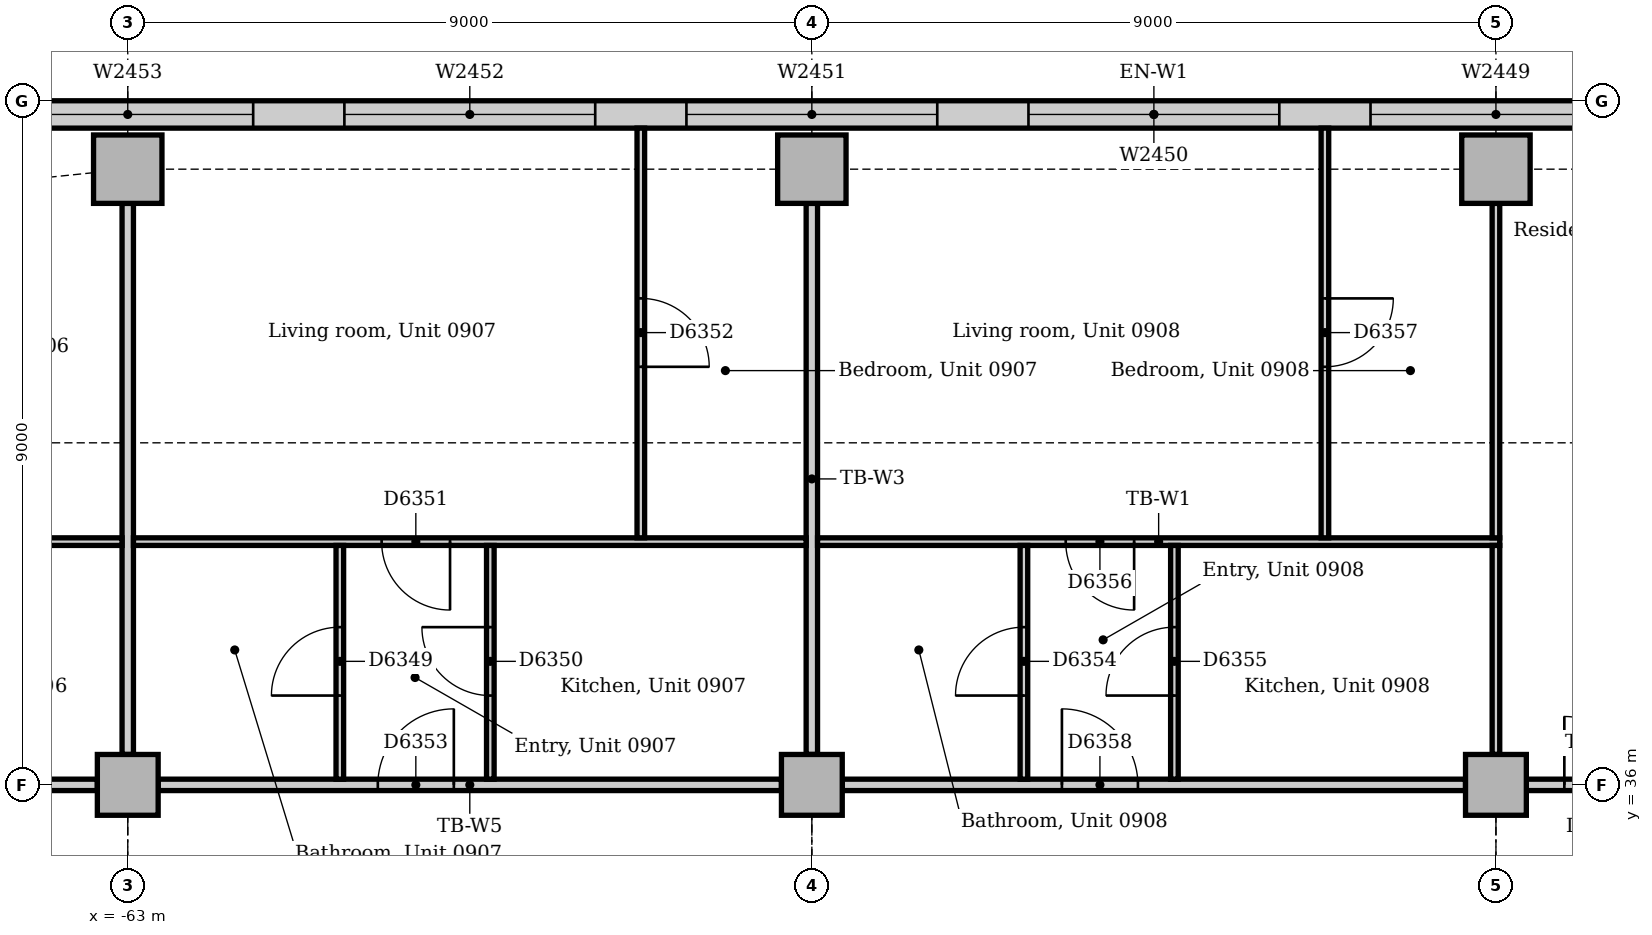
"""IFC4 building model, lengths in metres.
Left out: names, types, materials, properties, quantities, classifications, styles, units other than length and angle.
Written with IfcOpenShell. Run it as: python <this file> out.ifc"""

import sys

from ifc_helpers import new_model, si_unit, direction, frame, frame_2d, origin, origin_2d, place, context, subcontext, project, spatial, rectangle, extrude, element, fill, save


model = new_model("IFC4")
c1 = context("Model", 3, precision=1e-05, world=origin(), true_north=direction((0.0, 1.0)))
c2 = subcontext(c1, "Body", "Model", "MODEL_VIEW")
j1 = project(units=[si_unit("LENGTHUNIT", "METRE"), si_unit("PLANEANGLEUNIT", "RADIAN")], contexts=[c1])
p1 = place(None, origin())
s1 = spatial("IfcSite", under=j1, at=p1, CompositionType="ELEMENT")
p2 = place(p1, origin())
s2 = spatial("IfcBuilding", under=s1, at=p2, CompositionType="ELEMENT")
p3 = place(p2, frame((0.0, 0.0, 42.0)))
s3 = spatial("IfcBuildingStorey", under=s2, at=p3, CompositionType="ELEMENT", Elevation=42.0)
for number, where, z_axis, x_axis in (
    (1, (-63.0, 44.1, 0.0), (0.0, 0.0, 1.0), (1.0, 0.0, 0.0)),
    (2, (-54.0, 44.1, 0.0), (0.0, 0.0, 1.0), (1.0, 0.0, 0.0)),
    (3, (-45.0, 44.1, 0.0), (0.0, 0.0, 1.0), (1.0, 0.0, 0.0)),
):
    element("IfcColumn", number, at=place(p3, frame(where, z_axis=z_axis, x_axis=x_axis)), inside=s3, PredefinedType="COLUMN", context=c2, shape_type="SweptSolid", body=[
        extrude(rectangle(XDim=0.9, YDim=0.9, at=origin_2d()), origin(), (0.0, 0.0, 1.0), 3.7),
    ])
for number, where, z_axis, x_axis in (
    (4, (-63.0, 36.0, 0.0), (0.0, 0.0, 1.0), (1.0, 0.0, 0.0)),
    (5, (-54.0, 36.0, 0.0), (0.0, 0.0, 1.0), (1.0, 0.0, 0.0)),
    (6, (-45.0, 36.0, 0.0), (0.0, 0.0, 1.0), (1.0, 0.0, 0.0)),
):
    element("IfcColumn", number, at=place(p3, frame(where, z_axis=z_axis, x_axis=x_axis)), inside=s3, PredefinedType="COLUMN", context=c2, shape_type="SweptSolid", body=[
        extrude(rectangle(XDim=0.8, YDim=0.8, at=origin_2d()), origin(), (0.0, 0.0, 1.0), 3.7),
    ])
p4 = place(p3, frame((-31.243, 44.82, 0.0), z_axis=(0.0, 0.0, 1.0), x_axis=(-1.0, 0.0, 0.0)))
e7 = element("IfcWall", 7, at=p4, inside=s3, PredefinedType="STANDARD", context=c2, shape_type="SweptSolid", body=[
    extrude(rectangle(XDim=36.515, YDim=0.36, at=frame_2d((18.257, 0.0))), origin(), (0.0, 0.0, 1.0), 3.7),
])
p5 = place(p4, frame((3.107, 0.0, 0.9)))
e8 = element("IfcOpeningElement", 8, at=p5, cuts=e7, PredefinedType="OPENING", context=c2, shape_type="SweptSolid", body=[
    extrude(rectangle(XDim=3.3, YDim=1.6, at=frame_2d((1.65, 0.8))), frame((0.0, 0.19, 0.0), z_axis=(0.0, -1.0, 0.0), x_axis=(1.0, 0.0, 0.0)), (0.0, 0.0, 1.0), 0.38),
])
p6 = place(p4, frame((7.607, 0.0, 0.9)))
e9 = element("IfcOpeningElement", 9, at=p6, cuts=e7, PredefinedType="OPENING", context=c2, shape_type="SweptSolid", body=[
    extrude(rectangle(XDim=3.3, YDim=1.6, at=frame_2d((1.65, 0.8))), frame((0.0, 0.19, 0.0), z_axis=(0.0, -1.0, 0.0), x_axis=(1.0, 0.0, 0.0)), (0.0, 0.0, 1.0), 0.38),
])
p7 = place(p4, frame((12.107, 0.0, 0.9)))
e10 = element("IfcOpeningElement", 10, at=p7, cuts=e7, PredefinedType="OPENING", context=c2, shape_type="SweptSolid", body=[
    extrude(rectangle(XDim=3.3, YDim=1.6, at=frame_2d((1.65, 0.8))), frame((0.0, 0.19, 0.0), z_axis=(0.0, -1.0, 0.0), x_axis=(1.0, 0.0, 0.0)), (0.0, 0.0, 1.0), 0.38),
])
p8 = place(p4, frame((16.607, 0.0, 0.9)))
e11 = element("IfcOpeningElement", 11, at=p8, cuts=e7, PredefinedType="OPENING", context=c2, shape_type="SweptSolid", body=[
    extrude(rectangle(XDim=3.3, YDim=1.6, at=frame_2d((1.65, 0.8))), frame((0.0, 0.19, 0.0), z_axis=(0.0, -1.0, 0.0), x_axis=(1.0, 0.0, 0.0)), (0.0, 0.0, 1.0), 0.38),
])
p9 = place(p4, frame((21.107, 0.0, 0.9)))
e12 = element("IfcOpeningElement", 12, at=p9, cuts=e7, PredefinedType="OPENING", context=c2, shape_type="SweptSolid", body=[
    extrude(rectangle(XDim=3.3, YDim=1.6, at=frame_2d((1.65, 0.8))), frame((0.0, 0.19, 0.0), z_axis=(0.0, -1.0, 0.0), x_axis=(1.0, 0.0, 0.0)), (0.0, 0.0, 1.0), 0.38),
])
p10 = place(p4, frame((25.607, 0.0, 0.9)))
e13 = element("IfcOpeningElement", 13, at=p10, cuts=e7, PredefinedType="OPENING", context=c2, shape_type="SweptSolid", body=[
    extrude(rectangle(XDim=3.3, YDim=1.6, at=frame_2d((1.65, 0.8))), frame((0.0, 0.19, 0.0), z_axis=(0.0, -1.0, 0.0), x_axis=(1.0, 0.0, 0.0)), (0.0, 0.0, 1.0), 0.38),
])
p11 = place(p4, frame((30.107, 0.0, 0.9)))
e14 = element("IfcOpeningElement", 14, at=p11, cuts=e7, PredefinedType="OPENING", context=c2, shape_type="SweptSolid", body=[
    extrude(rectangle(XDim=3.3, YDim=1.6, at=frame_2d((1.65, 0.8))), frame((0.0, 0.19, 0.0), z_axis=(0.0, -1.0, 0.0), x_axis=(1.0, 0.0, 0.0)), (0.0, 0.0, 1.0), 0.38),
])
p12 = place(p3, frame((-44.6, 36.0, 0.0), z_axis=(0.0, 0.0, 1.0), x_axis=(1.0, 0.0, 0.0)))
e15 = element("IfcWall", 15, at=p12, inside=s3, PredefinedType="PARTITIONING", context=c2, shape_type="SweptSolid", body=[
    extrude(rectangle(XDim=1.875, YDim=0.15, at=frame_2d((0.938, 0.0))), origin(), (0.0, 0.0, 1.0), 3.452),
])
p13 = place(p12, frame((0.5, 0.0, 0.0)))
e16 = element("IfcOpeningElement", 16, at=p13, cuts=e15, PredefinedType="OPENING", context=c2, shape_type="SweptSolid", body=[
    extrude(rectangle(XDim=0.9, YDim=2.1, at=frame_2d((0.45, 1.05))), frame((0.0, 0.085, 0.0), z_axis=(0.0, -1.0, 0.0), x_axis=(1.0, 0.0, 0.0)), (0.0, 0.0, 1.0), 0.17),
])
p14 = place(p3, frame((-53.6, 36.0, 0.0), z_axis=(0.0, 0.0, 1.0), x_axis=(1.0, 0.0, 0.0)))
e17 = element("IfcWall", 17, at=p14, inside=s3, PredefinedType="PARTITIONING", context=c2, shape_type="SweptSolid", body=[
    extrude(rectangle(XDim=8.2, YDim=0.15, at=frame_2d((4.1, 0.0))), origin(), (0.0, 0.0, 1.0), 3.0),
])
p15 = place(p14, frame((2.89, 0.0, 0.0)))
e18 = element("IfcOpeningElement", 18, at=p15, cuts=e17, PredefinedType="OPENING", context=c2, shape_type="SweptSolid", body=[
    extrude(rectangle(XDim=1.0, YDim=2.1, at=frame_2d((0.5, 1.05))), frame((0.0, 0.085, 0.0), z_axis=(0.0, -1.0, 0.0), x_axis=(1.0, 0.0, 0.0)), (0.0, 0.0, 1.0), 0.17),
])
p16 = place(p3, frame((-62.6, 36.0, 0.0), z_axis=(0.0, 0.0, 1.0), x_axis=(1.0, 0.0, 0.0)))
e19 = element("IfcWall", 19, at=p16, inside=s3, PredefinedType="PARTITIONING", context=c2, shape_type="SweptSolid", body=[
    extrude(rectangle(XDim=8.2, YDim=0.15, at=frame_2d((4.1, 0.0))), origin(), (0.0, 0.0, 1.0), 3.0),
])
p17 = place(p16, frame((2.89, 0.0, 0.0)))
e20 = element("IfcOpeningElement", 20, at=p17, cuts=e19, PredefinedType="OPENING", context=c2, shape_type="SweptSolid", body=[
    extrude(rectangle(XDim=1.0, YDim=2.1, at=frame_2d((0.5, 1.05))), frame((0.0, 0.085, 0.0), z_axis=(0.0, -1.0, 0.0), x_axis=(1.0, 0.0, 0.0)), (0.0, 0.0, 1.0), 0.17),
])
p18 = place(p3, frame((-70.65, 36.0, 0.0), z_axis=(0.0, 0.0, 1.0), x_axis=(1.0, 0.0, 0.0)))
e21 = element("IfcWall", 21, at=p18, inside=s3, PredefinedType="PARTITIONING", context=c2, shape_type="SweptSolid", body=[
    extrude(rectangle(XDim=7.25, YDim=0.15, at=frame_2d((3.625, 0.0))), origin(), (0.0, 0.0, 1.0), 3.0),
])
p19 = place(p18, frame((2.138, 0.0, 0.0)))
e22 = element("IfcOpeningElement", 22, at=p19, cuts=e21, PredefinedType="OPENING", context=c2, shape_type="SweptSolid", body=[
    extrude(rectangle(XDim=1.0, YDim=2.1, at=frame_2d((0.5, 1.05))), frame((0.0, 0.085, 0.0), z_axis=(0.0, -1.0, 0.0), x_axis=(1.0, 0.0, 0.0)), (0.0, 0.0, 1.0), 0.17),
])
for number, where, z_axis, x_axis in (
    (23, (-63.0, 36.4, 0.0), (0.0, 0.0, 1.0), (0.0, 1.0, 0.0)),
    (24, (-54.0, 36.4, 0.0), (0.0, 0.0, 1.0), (0.0, 1.0, 0.0)),
):
    element("IfcWall", number, at=place(p3, frame(where, z_axis=z_axis, x_axis=x_axis)), inside=s3, PredefinedType="PARTITIONING", context=c2, shape_type="SweptSolid", body=[
        extrude(rectangle(XDim=7.25, YDim=0.15, at=frame_2d((3.625, 0.0))), origin(), (0.0, 0.0, 1.0), 3.008),
    ])
p20 = place(p3, frame((-53.925, 39.2, 0.0), z_axis=(0.0, 0.0, 1.0), x_axis=(1.0, 0.0, 0.0)))
e25 = element("IfcWall", 25, at=p20, inside=s3, PredefinedType="PARTITIONING", context=c2, shape_type="SweptSolid", body=[
    extrude(rectangle(XDim=8.975, YDim=0.1, at=frame_2d((4.487, 0.0))), origin(), (0.0, 0.0, 1.0), 3.7),
])
p21 = place(p20, frame((3.265, 0.0, 0.0)))
e26 = element("IfcOpeningElement", 26, at=p21, cuts=e25, PredefinedType="OPENING", context=c2, shape_type="SweptSolid", body=[
    extrude(rectangle(XDim=0.9, YDim=2.1, at=frame_2d((0.45, 1.05))), frame((0.0, 0.06, 0.0), z_axis=(0.0, -1.0, 0.0), x_axis=(1.0, 0.0, 0.0)), (0.0, 0.0, 1.0), 0.12),
])
p22 = place(p3, frame((-62.925, 39.2, 0.0), z_axis=(0.0, 0.0, 1.0), x_axis=(1.0, 0.0, 0.0)))
e27 = element("IfcWall", 27, at=p22, inside=s3, PredefinedType="PARTITIONING", context=c2, shape_type="SweptSolid", body=[
    extrude(rectangle(XDim=8.85, YDim=0.1, at=frame_2d((4.425, 0.0))), origin(), (0.0, 0.0, 1.0), 3.7),
])
p23 = place(p22, frame((3.265, 0.0, 0.0)))
e28 = element("IfcOpeningElement", 28, at=p23, cuts=e27, PredefinedType="OPENING", context=c2, shape_type="SweptSolid", body=[
    extrude(rectangle(XDim=0.9, YDim=2.1, at=frame_2d((0.45, 1.05))), frame((0.0, 0.06, 0.0), z_axis=(0.0, -1.0, 0.0), x_axis=(1.0, 0.0, 0.0)), (0.0, 0.0, 1.0), 0.12),
])
p24 = place(p3, frame((-71.64, 39.2, 0.0), z_axis=(0.0, 0.0, 1.0), x_axis=(1.0, 0.0, 0.0)))
e29 = element("IfcWall", 29, at=p24, inside=s3, PredefinedType="PARTITIONING", context=c2, shape_type="SweptSolid", body=[
    extrude(rectangle(XDim=8.565, YDim=0.1, at=frame_2d((4.282, 0.0))), origin(), (0.0, 0.0, 1.0), 3.7),
])
p25 = place(p24, frame((3.178, 0.0, 0.0)))
e30 = element("IfcOpeningElement", 30, at=p25, cuts=e29, PredefinedType="OPENING", context=c2, shape_type="SweptSolid", body=[
    extrude(rectangle(XDim=0.9, YDim=2.1, at=frame_2d((0.45, 1.05))), frame((0.0, 0.06, 0.0), z_axis=(0.0, -1.0, 0.0), x_axis=(1.0, 0.0, 0.0)), (0.0, 0.0, 1.0), 0.12),
])
p26 = place(p3, frame((-45.0, 39.25, 0.0), z_axis=(0.0, 0.0, 1.0), x_axis=(0.0, 1.0, 0.0)))
e31 = element("IfcWall", 31, at=p26, inside=s3, PredefinedType="PARTITIONING", context=c2, shape_type="SweptSolid", body=[
    extrude(rectangle(XDim=4.4, YDim=0.1, at=frame_2d((2.2, 0.0))), origin(), (0.0, 0.0, 1.0), 3.008),
])
p27 = place(p3, frame((-45.0, 36.4, 0.0), z_axis=(0.0, 0.0, 1.0), x_axis=(0.0, 1.0, 0.0)))
e32 = element("IfcWall", 32, at=p27, inside=s3, PredefinedType="PARTITIONING", context=c2, shape_type="SweptSolid", body=[
    extrude(rectangle(XDim=2.75, YDim=0.1, at=frame_2d((1.375, 0.0))), origin(), (0.0, 0.0, 1.0), 3.008),
])
p28 = place(p3, frame((-56.25, 39.25, 0.0), z_axis=(0.0, 0.0, 1.0), x_axis=(0.0, 1.0, 0.0)))
e33 = element("IfcWall", 33, at=p28, inside=s3, PredefinedType="PARTITIONING", context=c2, shape_type="SweptSolid", body=[
    extrude(rectangle(XDim=5.39, YDim=0.1, at=frame_2d((2.695, 0.0))), origin(), (0.0, 0.0, 1.0), 3.7),
])
p29 = place(p28, frame((2.25, 0.0, 0.0)))
e34 = element("IfcOpeningElement", 34, at=p29, cuts=e33, PredefinedType="OPENING", context=c2, shape_type="SweptSolid", body=[
    extrude(rectangle(XDim=0.9, YDim=2.1, at=frame_2d((0.45, 1.05))), frame((0.0, 0.06, 0.0), z_axis=(0.0, -1.0, 0.0), x_axis=(1.0, 0.0, 0.0)), (0.0, 0.0, 1.0), 0.12),
])
p30 = place(p3, frame((-47.25, 39.25, 0.0), z_axis=(0.0, 0.0, 1.0), x_axis=(0.0, 1.0, 0.0)))
e35 = element("IfcWall", 35, at=p30, inside=s3, PredefinedType="PARTITIONING", context=c2, shape_type="SweptSolid", body=[
    extrude(rectangle(XDim=5.39, YDim=0.1, at=frame_2d((2.695, 0.0))), origin(), (0.0, 0.0, 1.0), 3.7),
])
p31 = place(p30, frame((2.25, 0.0, 0.0)))
e36 = element("IfcOpeningElement", 36, at=p31, cuts=e35, PredefinedType="OPENING", context=c2, shape_type="SweptSolid", body=[
    extrude(rectangle(XDim=0.9, YDim=2.1, at=frame_2d((0.45, 1.05))), frame((0.0, 0.06, 0.0), z_axis=(0.0, -1.0, 0.0), x_axis=(1.0, 0.0, 0.0)), (0.0, 0.0, 1.0), 0.12),
])
p32 = place(p3, frame((-60.21, 36.075, 0.0), z_axis=(0.0, 0.0, 1.0), x_axis=(0.0, 1.0, 0.0)))
e37 = element("IfcWall", 37, at=p32, inside=s3, PredefinedType="PARTITIONING", context=c2, shape_type="SweptSolid", body=[
    extrude(rectangle(XDim=3.075, YDim=0.1, at=frame_2d((1.538, 0.0))), origin(), (0.0, 0.0, 1.0), 3.7),
])
p33 = place(p32, frame((1.1, 0.0, 0.0)))
e38 = element("IfcOpeningElement", 38, at=p33, cuts=e37, PredefinedType="OPENING", context=c2, shape_type="SweptSolid", body=[
    extrude(rectangle(XDim=0.9, YDim=2.1, at=frame_2d((0.45, 1.05))), frame((0.0, 0.06, 0.0), z_axis=(0.0, -1.0, 0.0), x_axis=(1.0, 0.0, 0.0)), (0.0, 0.0, 1.0), 0.12),
])
p34 = place(p3, frame((-58.23, 36.075, 0.0), z_axis=(0.0, 0.0, 1.0), x_axis=(0.0, 1.0, 0.0)))
e39 = element("IfcWall", 39, at=p34, inside=s3, PredefinedType="PARTITIONING", context=c2, shape_type="SweptSolid", body=[
    extrude(rectangle(XDim=3.075, YDim=0.1, at=frame_2d((1.538, 0.0))), origin(), (0.0, 0.0, 1.0), 3.7),
])
p35 = place(p34, frame((1.1, 0.0, 0.0)))
e40 = element("IfcOpeningElement", 40, at=p35, cuts=e39, PredefinedType="OPENING", context=c2, shape_type="SweptSolid", body=[
    extrude(rectangle(XDim=0.9, YDim=2.1, at=frame_2d((0.45, 1.05))), frame((0.0, 0.06, 0.0), z_axis=(0.0, -1.0, 0.0), x_axis=(1.0, 0.0, 0.0)), (0.0, 0.0, 1.0), 0.12),
])
p36 = place(p3, frame((-51.21, 36.075, 0.0), z_axis=(0.0, 0.0, 1.0), x_axis=(0.0, 1.0, 0.0)))
e41 = element("IfcWall", 41, at=p36, inside=s3, PredefinedType="PARTITIONING", context=c2, shape_type="SweptSolid", body=[
    extrude(rectangle(XDim=3.075, YDim=0.1, at=frame_2d((1.538, 0.0))), origin(), (0.0, 0.0, 1.0), 3.7),
])
p37 = place(p36, frame((1.1, 0.0, 0.0)))
e42 = element("IfcOpeningElement", 42, at=p37, cuts=e41, PredefinedType="OPENING", context=c2, shape_type="SweptSolid", body=[
    extrude(rectangle(XDim=0.9, YDim=2.1, at=frame_2d((0.45, 1.05))), frame((0.0, 0.06, 0.0), z_axis=(0.0, -1.0, 0.0), x_axis=(1.0, 0.0, 0.0)), (0.0, 0.0, 1.0), 0.12),
])
p38 = place(p3, frame((-49.23, 36.075, 0.0), z_axis=(0.0, 0.0, 1.0), x_axis=(0.0, 1.0, 0.0)))
e43 = element("IfcWall", 43, at=p38, inside=s3, PredefinedType="PARTITIONING", context=c2, shape_type="SweptSolid", body=[
    extrude(rectangle(XDim=3.075, YDim=0.1, at=frame_2d((1.538, 0.0))), origin(), (0.0, 0.0, 1.0), 3.7),
])
p39 = place(p38, frame((1.1, 0.0, 0.0)))
e44 = element("IfcOpeningElement", 44, at=p39, cuts=e43, PredefinedType="OPENING", context=c2, shape_type="SweptSolid", body=[
    extrude(rectangle(XDim=0.9, YDim=2.1, at=frame_2d((0.45, 1.05))), frame((0.0, 0.06, 0.0), z_axis=(0.0, -1.0, 0.0), x_axis=(1.0, 0.0, 0.0)), (0.0, 0.0, 1.0), 0.12),
])
p40 = place(p7, origin())
e45 = element("IfcWindow", 45, at=p40, inside=s3, PartitioningType="SINGLE_PANEL", PredefinedType="WINDOW", context=c2, shape_type="SweptSolid", body=[
    extrude(rectangle(XDim=3.3, YDim=1.6, at=frame_2d((1.65, 0.8))), frame((0.0, 0.13, 0.0), z_axis=(0.0, -1.0, 0.0), x_axis=(1.0, 0.0, 0.0)), (0.0, 0.0, 1.0), 0.06),
])
fill(e10, e45)
p41 = place(p8, origin())
e46 = element("IfcWindow", 46, at=p41, inside=s3, PartitioningType="SINGLE_PANEL", PredefinedType="WINDOW", context=c2, shape_type="SweptSolid", body=[
    extrude(rectangle(XDim=3.3, YDim=1.6, at=frame_2d((1.65, 0.8))), frame((0.0, 0.13, 0.0), z_axis=(0.0, -1.0, 0.0), x_axis=(1.0, 0.0, 0.0)), (0.0, 0.0, 1.0), 0.06),
])
fill(e11, e46)
p42 = place(p9, origin())
e47 = element("IfcWindow", 47, at=p42, inside=s3, PartitioningType="SINGLE_PANEL", PredefinedType="WINDOW", context=c2, shape_type="SweptSolid", body=[
    extrude(rectangle(XDim=3.3, YDim=1.6, at=frame_2d((1.65, 0.8))), frame((0.0, 0.13, 0.0), z_axis=(0.0, -1.0, 0.0), x_axis=(1.0, 0.0, 0.0)), (0.0, 0.0, 1.0), 0.06),
])
fill(e12, e47)
p43 = place(p10, origin())
e48 = element("IfcWindow", 48, at=p43, inside=s3, PartitioningType="SINGLE_PANEL", PredefinedType="WINDOW", context=c2, shape_type="SweptSolid", body=[
    extrude(rectangle(XDim=3.3, YDim=1.6, at=frame_2d((1.65, 0.8))), frame((0.0, 0.13, 0.0), z_axis=(0.0, -1.0, 0.0), x_axis=(1.0, 0.0, 0.0)), (0.0, 0.0, 1.0), 0.06),
])
fill(e13, e48)
p44 = place(p11, origin())
e49 = element("IfcWindow", 49, at=p44, inside=s3, PartitioningType="SINGLE_PANEL", PredefinedType="WINDOW", context=c2, shape_type="SweptSolid", body=[
    extrude(rectangle(XDim=3.3, YDim=1.6, at=frame_2d((1.65, 0.8))), frame((0.0, 0.13, 0.0), z_axis=(0.0, -1.0, 0.0), x_axis=(1.0, 0.0, 0.0)), (0.0, 0.0, 1.0), 0.06),
])
fill(e14, e49)
p45 = place(p13, origin())
e50 = element("IfcDoor", 50, at=p45, inside=s3, OperationType="SINGLE_SWING_LEFT", PredefinedType="DOOR", context=c2, shape_type="SweptSolid", body=[
    extrude(rectangle(XDim=0.9, YDim=2.1, at=frame_2d((0.45, 1.05))), frame((0.0, 0.025, 0.0), z_axis=(0.0, -1.0, 0.0), x_axis=(1.0, 0.0, 0.0)), (0.0, 0.0, 1.0), 0.05),
])
fill(e16, e50)
p46 = place(p33, origin())
e51 = element("IfcDoor", 51, at=p46, inside=s3, OperationType="SINGLE_SWING_LEFT", PredefinedType="DOOR", context=c2, shape_type="SweptSolid", body=[
    extrude(rectangle(XDim=0.9, YDim=2.1, at=frame_2d((0.45, 1.05))), frame((0.0, 0.025, 0.0), z_axis=(0.0, -1.0, 0.0), x_axis=(1.0, 0.0, 0.0)), (0.0, 0.0, 1.0), 0.05),
])
fill(e38, e51)
p47 = place(p35, origin())
e52 = element("IfcDoor", 52, at=p47, inside=s3, OperationType="SINGLE_SWING_RIGHT", PredefinedType="DOOR", context=c2, shape_type="SweptSolid", body=[
    extrude(rectangle(XDim=0.9, YDim=2.1, at=frame_2d((0.45, 1.05))), frame((0.0, 0.025, 0.0), z_axis=(0.0, -1.0, 0.0), x_axis=(1.0, 0.0, 0.0)), (0.0, 0.0, 1.0), 0.05),
])
fill(e40, e52)
p48 = place(p23, frame((0.9, 0.0, 0.0), z_axis=(0.0, 0.0, 1.0), x_axis=(-1.0, 0.0, 0.0)))
e53 = element("IfcDoor", 53, at=p48, inside=s3, OperationType="SINGLE_SWING_LEFT", PredefinedType="DOOR", context=c2, shape_type="SweptSolid", body=[
    extrude(rectangle(XDim=0.9, YDim=2.1, at=frame_2d((0.45, 1.05))), frame((0.0, 0.025, 0.0), z_axis=(0.0, -1.0, 0.0), x_axis=(1.0, 0.0, 0.0)), (0.0, 0.0, 1.0), 0.05),
])
fill(e28, e53)
p49 = place(p29, frame((0.9, 0.0, 0.0), z_axis=(0.0, 0.0, 1.0), x_axis=(-1.0, 0.0, 0.0)))
e54 = element("IfcDoor", 54, at=p49, inside=s3, OperationType="SINGLE_SWING_RIGHT", PredefinedType="DOOR", context=c2, shape_type="SweptSolid", body=[
    extrude(rectangle(XDim=0.9, YDim=2.1, at=frame_2d((0.45, 1.05))), frame((0.0, 0.025, 0.0), z_axis=(0.0, -1.0, 0.0), x_axis=(1.0, 0.0, 0.0)), (0.0, 0.0, 1.0), 0.05),
])
fill(e34, e54)
p50 = place(p17, origin())
e55 = element("IfcDoor", 55, at=p50, inside=s3, OperationType="SINGLE_SWING_RIGHT", PredefinedType="DOOR", context=c2, shape_type="SweptSolid", body=[
    extrude(rectangle(XDim=1.0, YDim=2.1, at=frame_2d((0.5, 1.05))), frame((0.0, 0.025, 0.0), z_axis=(0.0, -1.0, 0.0), x_axis=(1.0, 0.0, 0.0)), (0.0, 0.0, 1.0), 0.05),
])
fill(e20, e55)
p51 = place(p37, origin())
e56 = element("IfcDoor", 56, at=p51, inside=s3, OperationType="SINGLE_SWING_LEFT", PredefinedType="DOOR", context=c2, shape_type="SweptSolid", body=[
    extrude(rectangle(XDim=0.9, YDim=2.1, at=frame_2d((0.45, 1.05))), frame((0.0, 0.025, 0.0), z_axis=(0.0, -1.0, 0.0), x_axis=(1.0, 0.0, 0.0)), (0.0, 0.0, 1.0), 0.05),
])
fill(e42, e56)
p52 = place(p39, origin())
e57 = element("IfcDoor", 57, at=p52, inside=s3, OperationType="SINGLE_SWING_LEFT", PredefinedType="DOOR", context=c2, shape_type="SweptSolid", body=[
    extrude(rectangle(XDim=0.9, YDim=2.1, at=frame_2d((0.45, 1.05))), frame((0.0, 0.025, 0.0), z_axis=(0.0, -1.0, 0.0), x_axis=(1.0, 0.0, 0.0)), (0.0, 0.0, 1.0), 0.05),
])
fill(e44, e57)
p53 = place(p21, frame((0.9, 0.0, 0.0), z_axis=(0.0, 0.0, 1.0), x_axis=(-1.0, 0.0, 0.0)))
e58 = element("IfcDoor", 58, at=p53, inside=s3, OperationType="SINGLE_SWING_LEFT", PredefinedType="DOOR", context=c2, shape_type="SweptSolid", body=[
    extrude(rectangle(XDim=0.9, YDim=2.1, at=frame_2d((0.45, 1.05))), frame((0.0, 0.025, 0.0), z_axis=(0.0, -1.0, 0.0), x_axis=(1.0, 0.0, 0.0)), (0.0, 0.0, 1.0), 0.05),
])
fill(e26, e58)
p54 = place(p31, frame((0.9, 0.0, 0.0), z_axis=(0.0, 0.0, 1.0), x_axis=(-1.0, 0.0, 0.0)))
e59 = element("IfcDoor", 59, at=p54, inside=s3, OperationType="SINGLE_SWING_LEFT", PredefinedType="DOOR", context=c2, shape_type="SweptSolid", body=[
    extrude(rectangle(XDim=0.9, YDim=2.1, at=frame_2d((0.45, 1.05))), frame((0.0, 0.025, 0.0), z_axis=(0.0, -1.0, 0.0), x_axis=(1.0, 0.0, 0.0)), (0.0, 0.0, 1.0), 0.05),
])
fill(e36, e59)
p55 = place(p15, origin())
e60 = element("IfcDoor", 60, at=p55, inside=s3, OperationType="SINGLE_SWING_LEFT", PredefinedType="DOOR", context=c2, shape_type="SweptSolid", body=[
    extrude(rectangle(XDim=1.0, YDim=2.1, at=frame_2d((0.5, 1.05))), frame((0.0, 0.025, 0.0), z_axis=(0.0, -1.0, 0.0), x_axis=(1.0, 0.0, 0.0)), (0.0, 0.0, 1.0), 0.05),
])
fill(e18, e60)
save(model, sys.argv[1])
